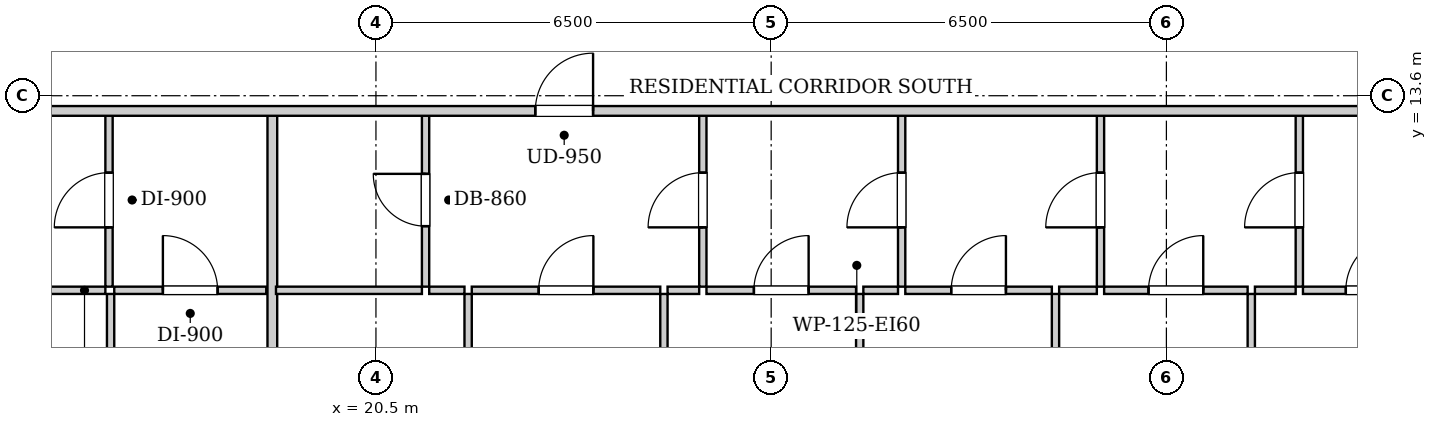
"""IFC4 building model, lengths in metres.
Left out: names, types, materials, properties, quantities, classifications, styles, units other than length and angle.
Written with IfcOpenShell. Run it as: python <this file> out.ifc"""

import sys

from ifc_helpers import new_model, si_unit, direction, frame, frame_2d, origin, place, context, subcontext, project, spatial, rectangle, extrude, element, fill, save


model = new_model("IFC4")
c1 = context("Model", 3, precision=1e-05, world=origin(), true_north=direction((0.0, 1.0)))
c2 = subcontext(c1, "Body", "Model", "MODEL_VIEW")
j1 = project(units=[si_unit("LENGTHUNIT", "METRE"), si_unit("PLANEANGLEUNIT", "RADIAN")], contexts=[c1])
p1 = place(None, origin())
s1 = spatial("IfcSite", under=j1, at=p1, CompositionType="ELEMENT")
p2 = place(p1, origin())
s2 = spatial("IfcBuilding", under=s1, at=p2, CompositionType="ELEMENT")
p3 = place(p2, frame((0.0, 0.0, 64.2)))
s3 = spatial("IfcBuildingStorey", under=s2, at=p3, CompositionType="ELEMENT", Elevation=64.2)
p4 = place(p3, frame((16.11, 10.46, 0.0), z_axis=(0.0, 0.0, 1.0), x_axis=(0.0, 1.0, 0.0)))
e1 = element("IfcWall", 1, at=p4, inside=s3, PredefinedType="PARTITIONING", context=c2, shape_type="SweptSolid", body=[
    extrude(rectangle(XDim=2.85, YDim=0.12, at=frame_2d((1.425, 0.0))), origin(), (0.0, 0.0, 1.0), 2.94),
])
p5 = place(p4, frame((0.975, 0.0, 0.0)))
e2 = element("IfcOpeningElement", 2, at=p5, cuts=e1, PredefinedType="OPENING", context=c2, shape_type="SweptSolid", body=[
    extrude(rectangle(XDim=0.9, YDim=2.05, at=frame_2d((0.45, 1.025))), frame((0.0, 0.07, 0.0), z_axis=(0.0, -1.0, 0.0), x_axis=(1.0, 0.0, 0.0)), (0.0, 0.0, 1.0), 0.14),
])
p6 = place(p3, frame((12.6, 10.4, 0.0), z_axis=(0.0, 0.0, 1.0), x_axis=(1.0, 0.0, 0.0)))
e3 = element("IfcWall", 3, at=p6, inside=s3, PredefinedType="PARTITIONING", context=c2, shape_type="SweptSolid", body=[
    extrude(rectangle(XDim=3.45, YDim=0.12, at=frame_2d((1.725, 0.0))), origin(), (0.0, 0.0, 1.0), 2.94),
])
p7 = place(p6, frame((1.275, 0.0, 0.0)))
e4 = element("IfcOpeningElement", 4, at=p7, cuts=e3, PredefinedType="OPENING", context=c2, shape_type="SweptSolid", body=[
    extrude(rectangle(XDim=0.9, YDim=2.05, at=frame_2d((0.45, 1.025))), frame((0.0, 0.07, 0.0), z_axis=(0.0, -1.0, 0.0), x_axis=(1.0, 0.0, 0.0)), (0.0, 0.0, 1.0), 0.14),
])
p8 = place(p3, frame((16.196, 10.4, 0.0), z_axis=(0.0, 0.0, 1.0), x_axis=(1.0, 0.0, 0.0)))
e5 = element("IfcWall", 5, at=p8, inside=s3, PredefinedType="PARTITIONING", context=c2, shape_type="SweptSolid", body=[
    extrude(rectangle(XDim=2.5, YDim=0.12, at=frame_2d((1.25, 0.0))), origin(), (0.0, 0.0, 1.0), 2.94),
])
p9 = place(p8, frame((0.8, 0.0, 0.0)))
e6 = element("IfcOpeningElement", 6, at=p9, cuts=e5, PredefinedType="OPENING", context=c2, shape_type="SweptSolid", body=[
    extrude(rectangle(XDim=0.9, YDim=2.05, at=frame_2d((0.45, 1.025))), frame((0.0, 0.07, 0.0), z_axis=(0.0, -1.0, 0.0), x_axis=(1.0, 0.0, 0.0)), (0.0, 0.0, 1.0), 0.14),
])
p10 = place(p3, frame((16.136, 2.43, 0.0), z_axis=(0.0, 0.0, 1.0), x_axis=(0.0, 1.0, 0.0)))
e7 = element("IfcWall", 7, at=p10, inside=s3, PredefinedType="PARTITIONING", context=c2, shape_type="SweptSolid", body=[
    extrude(rectangle(XDim=7.91, YDim=0.12, at=frame_2d((3.955, 0.0))), origin(), (0.0, 0.0, 1.0), 2.94),
])
p11 = place(p10, frame((3.505, 0.0, 0.0)))
e8 = element("IfcOpeningElement", 8, at=p11, cuts=e7, PredefinedType="OPENING", context=c2, shape_type="SweptSolid", body=[
    extrude(rectangle(XDim=0.9, YDim=2.05, at=frame_2d((0.45, 1.025))), frame((0.0, 0.07, 0.0), z_axis=(0.0, -1.0, 0.0), x_axis=(1.0, 0.0, 0.0)), (0.0, 0.0, 1.0), 0.14),
])
p12 = place(p3, frame((18.796, 0.28, 0.0), z_axis=(0.0, 0.0, 1.0), x_axis=(0.0, 1.0, 0.0)))
e9 = element("IfcWall", 9, at=p12, inside=s3, PredefinedType="PARTITIONING", context=c2, shape_type="SweptSolid", body=[
    extrude(rectangle(XDim=13.03, YDim=0.16, at=frame_2d((6.515, 0.0))), origin(), (0.0, 0.0, 1.0), 2.94),
])
p13 = place(p3, frame((21.316, 10.46, 0.0), z_axis=(0.0, 0.0, 1.0), x_axis=(0.0, 1.0, 0.0)))
e10 = element("IfcWall", 10, at=p13, inside=s3, PredefinedType="PARTITIONING", context=c2, shape_type="SweptSolid", body=[
    extrude(rectangle(XDim=2.85, YDim=0.12, at=frame_2d((1.425, 0.0))), origin(), (0.0, 0.0, 1.0), 2.94),
])
p14 = place(p13, frame((0.995, 0.0, 0.0)))
e11 = element("IfcOpeningElement", 11, at=p14, cuts=e10, PredefinedType="OPENING", context=c2, shape_type="SweptSolid", body=[
    extrude(rectangle(XDim=0.86, YDim=2.05, at=frame_2d((0.43, 1.025))), frame((0.0, 0.07, 0.0), z_axis=(0.0, -1.0, 0.0), x_axis=(1.0, 0.0, 0.0)), (0.0, 0.0, 1.0), 0.14),
])
p15 = place(p3, frame((18.856, 10.4, 0.0), z_axis=(0.0, 0.0, 1.0), x_axis=(1.0, 0.0, 0.0)))
e12 = element("IfcWall", 12, at=p15, inside=s3, PredefinedType="PARTITIONING", context=c2, shape_type="SweptSolid", body=[
    extrude(rectangle(XDim=2.4, YDim=0.12, at=frame_2d((1.2, 0.0))), origin(), (0.0, 0.0, 1.0), 2.94),
])
p16 = place(p3, frame((25.876, 10.46, 0.0), z_axis=(0.0, 0.0, 1.0), x_axis=(0.0, 1.0, 0.0)))
e13 = element("IfcWall", 13, at=p16, inside=s3, PredefinedType="PARTITIONING", context=c2, shape_type="SweptSolid", body=[
    extrude(rectangle(XDim=2.85, YDim=0.12, at=frame_2d((1.425, 0.0))), origin(), (0.0, 0.0, 1.0), 2.94),
])
p17 = place(p16, frame((0.975, 0.0, 0.0)))
e14 = element("IfcOpeningElement", 14, at=p17, cuts=e13, PredefinedType="OPENING", context=c2, shape_type="SweptSolid", body=[
    extrude(rectangle(XDim=0.9, YDim=2.05, at=frame_2d((0.45, 1.025))), frame((0.0, 0.07, 0.0), z_axis=(0.0, -1.0, 0.0), x_axis=(1.0, 0.0, 0.0)), (0.0, 0.0, 1.0), 0.14),
])
p18 = place(p3, frame((21.376, 10.4, 0.0), z_axis=(0.0, 0.0, 1.0), x_axis=(1.0, 0.0, 0.0)))
e15 = element("IfcWall", 15, at=p18, inside=s3, PredefinedType="PARTITIONING", context=c2, shape_type="SweptSolid", body=[
    extrude(rectangle(XDim=0.58, YDim=0.12, at=frame_2d((0.29, 0.0))), origin(), (0.0, 0.0, 1.0), 2.94),
])
p19 = place(p3, frame((22.076, 10.4, 0.0), z_axis=(0.0, 0.0, 1.0), x_axis=(1.0, 0.0, 0.0)))
e16 = element("IfcWall", 16, at=p19, inside=s3, PredefinedType="PARTITIONING", context=c2, shape_type="SweptSolid", body=[
    extrude(rectangle(XDim=3.1, YDim=0.12, at=frame_2d((1.55, 0.0))), origin(), (0.0, 0.0, 1.0), 2.94),
])
p20 = place(p19, frame((1.1, 0.0, 0.0)))
e17 = element("IfcOpeningElement", 17, at=p20, cuts=e16, PredefinedType="OPENING", context=c2, shape_type="SweptSolid", body=[
    extrude(rectangle(XDim=0.9, YDim=2.05, at=frame_2d((0.45, 1.025))), frame((0.0, 0.07, 0.0), z_axis=(0.0, -1.0, 0.0), x_axis=(1.0, 0.0, 0.0)), (0.0, 0.0, 1.0), 0.14),
])
p21 = place(p3, frame((25.296, 10.4, 0.0), z_axis=(0.0, 0.0, 1.0), x_axis=(1.0, 0.0, 0.0)))
e18 = element("IfcWall", 18, at=p21, inside=s3, PredefinedType="PARTITIONING", context=c2, shape_type="SweptSolid", body=[
    extrude(rectangle(XDim=0.52, YDim=0.12, at=frame_2d((0.26, 0.0))), origin(), (0.0, 0.0, 1.0), 2.94),
])
p22 = place(p3, frame((29.146, 10.46, 0.0), z_axis=(0.0, 0.0, 1.0), x_axis=(0.0, 1.0, 0.0)))
e19 = element("IfcWall", 19, at=p22, inside=s3, PredefinedType="PARTITIONING", context=c2, shape_type="SweptSolid", body=[
    extrude(rectangle(XDim=2.85, YDim=0.12, at=frame_2d((1.425, 0.0))), origin(), (0.0, 0.0, 1.0), 2.94),
])
p23 = place(p22, frame((0.975, 0.0, 0.0)))
e20 = element("IfcOpeningElement", 20, at=p23, cuts=e19, PredefinedType="OPENING", context=c2, shape_type="SweptSolid", body=[
    extrude(rectangle(XDim=0.9, YDim=2.05, at=frame_2d((0.45, 1.025))), frame((0.0, 0.07, 0.0), z_axis=(0.0, -1.0, 0.0), x_axis=(1.0, 0.0, 0.0)), (0.0, 0.0, 1.0), 0.14),
])
p24 = place(p3, frame((25.936, 10.4, 0.0), z_axis=(0.0, 0.0, 1.0), x_axis=(1.0, 0.0, 0.0)))
e21 = element("IfcWall", 21, at=p24, inside=s3, PredefinedType="PARTITIONING", context=c2, shape_type="SweptSolid", body=[
    extrude(rectangle(XDim=2.46, YDim=0.12, at=frame_2d((1.23, 0.0))), origin(), (0.0, 0.0, 1.0), 2.94),
])
p25 = place(p24, frame((0.78, 0.0, 0.0)))
e22 = element("IfcOpeningElement", 22, at=p25, cuts=e21, PredefinedType="OPENING", context=c2, shape_type="SweptSolid", body=[
    extrude(rectangle(XDim=0.9, YDim=2.05, at=frame_2d((0.45, 1.025))), frame((0.0, 0.07, 0.0), z_axis=(0.0, -1.0, 0.0), x_axis=(1.0, 0.0, 0.0)), (0.0, 0.0, 1.0), 0.14),
])
p26 = place(p3, frame((28.516, 10.4, 0.0), z_axis=(0.0, 0.0, 1.0), x_axis=(1.0, 0.0, 0.0)))
e23 = element("IfcWall", 23, at=p26, inside=s3, PredefinedType="PARTITIONING", context=c2, shape_type="SweptSolid", body=[
    extrude(rectangle(XDim=0.57, YDim=0.12, at=frame_2d((0.285, 0.0))), origin(), (0.0, 0.0, 1.0), 2.94),
])
p27 = place(p3, frame((32.416, 10.46, 0.0), z_axis=(0.0, 0.0, 1.0), x_axis=(0.0, 1.0, 0.0)))
e24 = element("IfcWall", 24, at=p27, inside=s3, PredefinedType="PARTITIONING", context=c2, shape_type="SweptSolid", body=[
    extrude(rectangle(XDim=2.85, YDim=0.12, at=frame_2d((1.425, 0.0))), origin(), (0.0, 0.0, 1.0), 2.94),
])
p28 = place(p27, frame((0.975, 0.0, 0.0)))
e25 = element("IfcOpeningElement", 25, at=p28, cuts=e24, PredefinedType="OPENING", context=c2, shape_type="SweptSolid", body=[
    extrude(rectangle(XDim=0.9, YDim=2.05, at=frame_2d((0.45, 1.025))), frame((0.0, 0.07, 0.0), z_axis=(0.0, -1.0, 0.0), x_axis=(1.0, 0.0, 0.0)), (0.0, 0.0, 1.0), 0.14),
])
p29 = place(p3, frame((29.206, 10.4, 0.0), z_axis=(0.0, 0.0, 1.0), x_axis=(1.0, 0.0, 0.0)))
e26 = element("IfcWall", 26, at=p29, inside=s3, PredefinedType="PARTITIONING", context=c2, shape_type="SweptSolid", body=[
    extrude(rectangle(XDim=2.41, YDim=0.12, at=frame_2d((1.205, 0.0))), origin(), (0.0, 0.0, 1.0), 2.94),
])
p30 = place(p29, frame((0.755, 0.0, 0.0)))
e27 = element("IfcOpeningElement", 27, at=p30, cuts=e26, PredefinedType="OPENING", context=c2, shape_type="SweptSolid", body=[
    extrude(rectangle(XDim=0.9, YDim=2.05, at=frame_2d((0.45, 1.025))), frame((0.0, 0.07, 0.0), z_axis=(0.0, -1.0, 0.0), x_axis=(1.0, 0.0, 0.0)), (0.0, 0.0, 1.0), 0.14),
])
p31 = place(p3, frame((31.736, 10.4, 0.0), z_axis=(0.0, 0.0, 1.0), x_axis=(1.0, 0.0, 0.0)))
e28 = element("IfcWall", 28, at=p31, inside=s3, PredefinedType="PARTITIONING", context=c2, shape_type="SweptSolid", body=[
    extrude(rectangle(XDim=0.62, YDim=0.12, at=frame_2d((0.31, 0.0))), origin(), (0.0, 0.0, 1.0), 2.94),
])
p32 = place(p3, frame((35.686, 10.46, 0.0), z_axis=(0.0, 0.0, 1.0), x_axis=(0.0, 1.0, 0.0)))
e29 = element("IfcWall", 29, at=p32, inside=s3, PredefinedType="PARTITIONING", context=c2, shape_type="SweptSolid", body=[
    extrude(rectangle(XDim=2.85, YDim=0.12, at=frame_2d((1.425, 0.0))), origin(), (0.0, 0.0, 1.0), 2.94),
])
p33 = place(p32, frame((0.975, 0.0, 0.0)))
e30 = element("IfcOpeningElement", 30, at=p33, cuts=e29, PredefinedType="OPENING", context=c2, shape_type="SweptSolid", body=[
    extrude(rectangle(XDim=0.9, YDim=2.05, at=frame_2d((0.45, 1.025))), frame((0.0, 0.07, 0.0), z_axis=(0.0, -1.0, 0.0), x_axis=(1.0, 0.0, 0.0)), (0.0, 0.0, 1.0), 0.14),
])
p34 = place(p3, frame((32.476, 10.4, 0.0), z_axis=(0.0, 0.0, 1.0), x_axis=(1.0, 0.0, 0.0)))
e31 = element("IfcWall", 31, at=p34, inside=s3, PredefinedType="PARTITIONING", context=c2, shape_type="SweptSolid", body=[
    extrude(rectangle(XDim=2.36, YDim=0.12, at=frame_2d((1.18, 0.0))), origin(), (0.0, 0.0, 1.0), 2.94),
])
p35 = place(p34, frame((0.73, 0.0, 0.0)))
e32 = element("IfcOpeningElement", 32, at=p35, cuts=e31, PredefinedType="OPENING", context=c2, shape_type="SweptSolid", body=[
    extrude(rectangle(XDim=0.9, YDim=2.05, at=frame_2d((0.45, 1.025))), frame((0.0, 0.07, 0.0), z_axis=(0.0, -1.0, 0.0), x_axis=(1.0, 0.0, 0.0)), (0.0, 0.0, 1.0), 0.14),
])
p36 = place(p3, frame((34.956, 10.4, 0.0), z_axis=(0.0, 0.0, 1.0), x_axis=(1.0, 0.0, 0.0)))
e33 = element("IfcWall", 33, at=p36, inside=s3, PredefinedType="PARTITIONING", context=c2, shape_type="SweptSolid", body=[
    extrude(rectangle(XDim=0.67, YDim=0.12, at=frame_2d((0.335, 0.0))), origin(), (0.0, 0.0, 1.0), 2.94),
])
p37 = place(p3, frame((35.746, 10.4, 0.0), z_axis=(0.0, 0.0, 1.0), x_axis=(1.0, 0.0, 0.0)))
e34 = element("IfcWall", 34, at=p37, inside=s3, PredefinedType="PARTITIONING", context=c2, shape_type="SweptSolid", body=[
    extrude(rectangle(XDim=2.31, YDim=0.12, at=frame_2d((1.155, 0.0))), origin(), (0.0, 0.0, 1.0), 2.94),
])
p38 = place(p37, frame((0.705, 0.0, 0.0)))
e35 = element("IfcOpeningElement", 35, at=p38, cuts=e34, PredefinedType="OPENING", context=c2, shape_type="SweptSolid", body=[
    extrude(rectangle(XDim=0.9, YDim=2.05, at=frame_2d((0.45, 1.025))), frame((0.0, 0.07, 0.0), z_axis=(0.0, -1.0, 0.0), x_axis=(1.0, 0.0, 0.0)), (0.0, 0.0, 1.0), 0.14),
])
p39 = place(p3, frame((22.016, 0.28, 0.0), z_axis=(0.0, 0.0, 1.0), x_axis=(0.0, 1.0, 0.0)))
e36 = element("IfcWall", 36, at=p39, inside=s3, PredefinedType="PARTITIONING", context=c2, shape_type="SweptSolid", body=[
    extrude(rectangle(XDim=10.06, YDim=0.12, at=frame_2d((5.03, 0.0))), origin(), (0.0, 0.0, 1.0), 2.94),
])
p40 = place(p39, frame((4.565, 0.0, 0.0)))
e37 = element("IfcOpeningElement", 37, at=p40, cuts=e36, PredefinedType="OPENING", context=c2, shape_type="SweptSolid", body=[
    extrude(rectangle(XDim=0.9, YDim=2.05, at=frame_2d((0.45, 1.025))), frame((0.0, 0.07, 0.0), z_axis=(0.0, -1.0, 0.0), x_axis=(1.0, 0.0, 0.0)), (0.0, 0.0, 1.0), 0.14),
])
p41 = place(p3, frame((25.236, 0.28, 0.0), z_axis=(0.0, 0.0, 1.0), x_axis=(0.0, 1.0, 0.0)))
e38 = element("IfcWall", 38, at=p41, inside=s3, PredefinedType="PARTITIONING", context=c2, shape_type="SweptSolid", body=[
    extrude(rectangle(XDim=10.06, YDim=0.12, at=frame_2d((5.03, 0.0))), origin(), (0.0, 0.0, 1.0), 2.94),
])
p42 = place(p41, frame((4.565, 0.0, 0.0)))
e39 = element("IfcOpeningElement", 39, at=p42, cuts=e38, PredefinedType="OPENING", context=c2, shape_type="SweptSolid", body=[
    extrude(rectangle(XDim=0.9, YDim=2.05, at=frame_2d((0.45, 1.025))), frame((0.0, 0.07, 0.0), z_axis=(0.0, -1.0, 0.0), x_axis=(1.0, 0.0, 0.0)), (0.0, 0.0, 1.0), 0.14),
])
p43 = place(p3, frame((28.456, 0.28, 0.0), z_axis=(0.0, 0.0, 1.0), x_axis=(0.0, 1.0, 0.0)))
e40 = element("IfcWall", 40, at=p43, inside=s3, PredefinedType="PARTITIONING", context=c2, shape_type="SweptSolid", body=[
    extrude(rectangle(XDim=10.06, YDim=0.12, at=frame_2d((5.03, 0.0))), origin(), (0.0, 0.0, 1.0), 2.94),
])
p44 = place(p43, frame((4.565, 0.0, 0.0)))
e41 = element("IfcOpeningElement", 41, at=p44, cuts=e40, PredefinedType="OPENING", context=c2, shape_type="SweptSolid", body=[
    extrude(rectangle(XDim=0.9, YDim=2.05, at=frame_2d((0.45, 1.025))), frame((0.0, 0.07, 0.0), z_axis=(0.0, -1.0, 0.0), x_axis=(1.0, 0.0, 0.0)), (0.0, 0.0, 1.0), 0.14),
])
p45 = place(p3, frame((31.676, 0.28, 0.0), z_axis=(0.0, 0.0, 1.0), x_axis=(0.0, 1.0, 0.0)))
e42 = element("IfcWall", 42, at=p45, inside=s3, PredefinedType="PARTITIONING", context=c2, shape_type="SweptSolid", body=[
    extrude(rectangle(XDim=10.06, YDim=0.12, at=frame_2d((5.03, 0.0))), origin(), (0.0, 0.0, 1.0), 2.94),
])
p46 = place(p45, frame((4.565, 0.0, 0.0)))
e43 = element("IfcOpeningElement", 43, at=p46, cuts=e42, PredefinedType="OPENING", context=c2, shape_type="SweptSolid", body=[
    extrude(rectangle(XDim=0.9, YDim=2.05, at=frame_2d((0.45, 1.025))), frame((0.0, 0.07, 0.0), z_axis=(0.0, -1.0, 0.0), x_axis=(1.0, 0.0, 0.0)), (0.0, 0.0, 1.0), 0.14),
])
p47 = place(p3, frame((34.896, 0.28, 0.0), z_axis=(0.0, 0.0, 1.0), x_axis=(0.0, 1.0, 0.0)))
e44 = element("IfcWall", 44, at=p47, inside=s3, PredefinedType="PARTITIONING", context=c2, shape_type="SweptSolid", body=[
    extrude(rectangle(XDim=10.06, YDim=0.12, at=frame_2d((5.03, 0.0))), origin(), (0.0, 0.0, 1.0), 2.94),
])
p48 = place(p47, frame((4.565, 0.0, 0.0)))
e45 = element("IfcOpeningElement", 45, at=p48, cuts=e44, PredefinedType="OPENING", context=c2, shape_type="SweptSolid", body=[
    extrude(rectangle(XDim=0.9, YDim=2.05, at=frame_2d((0.45, 1.025))), frame((0.0, 0.07, 0.0), z_axis=(0.0, -1.0, 0.0), x_axis=(1.0, 0.0, 0.0)), (0.0, 0.0, 1.0), 0.14),
])
p49 = place(p3, frame((10.05, 13.35, 0.0), z_axis=(0.0, 0.0, 1.0), x_axis=(1.0, 0.0, 0.0)))
e46 = element("IfcWall", 46, at=p49, inside=s3, PredefinedType="PARTITIONING", context=c2, shape_type="SweptSolid", body=[
    extrude(rectangle(XDim=33.9, YDim=0.16, at=frame_2d((16.95, 0.0))), origin(), (0.0, 0.0, 1.0), 2.94),
])
p50 = place(p49, frame((3.8, 0.0, 0.0)))
e47 = element("IfcOpeningElement", 47, at=p50, cuts=e46, PredefinedType="OPENING", context=c2, shape_type="SweptSolid", body=[
    extrude(rectangle(XDim=0.95, YDim=2.1, at=frame_2d((0.475, 1.05))), frame((0.0, 0.09, 0.0), z_axis=(0.0, -1.0, 0.0), x_axis=(1.0, 0.0, 0.0)), (0.0, 0.0, 1.0), 0.18),
])
p51 = place(p49, frame((13.071, 0.0, 0.0)))
e48 = element("IfcOpeningElement", 48, at=p51, cuts=e46, PredefinedType="OPENING", context=c2, shape_type="SweptSolid", body=[
    extrude(rectangle(XDim=0.95, YDim=2.1, at=frame_2d((0.475, 1.05))), frame((0.0, 0.09, 0.0), z_axis=(0.0, -1.0, 0.0), x_axis=(1.0, 0.0, 0.0)), (0.0, 0.0, 1.0), 0.18),
])
p52 = place(p5, origin())
e49 = element("IfcDoor", 49, at=p52, inside=s3, OperationType="SINGLE_SWING_LEFT", PredefinedType="DOOR", context=c2, shape_type="SweptSolid", body=[
    extrude(rectangle(XDim=0.9, YDim=2.05, at=frame_2d((0.45, 1.025))), frame((0.0, 0.025, 0.0), z_axis=(0.0, -1.0, 0.0), x_axis=(1.0, 0.0, 0.0)), (0.0, 0.0, 1.0), 0.05),
])
fill(e2, e49)
p53 = place(p9, origin())
e50 = element("IfcDoor", 50, at=p53, inside=s3, OperationType="SINGLE_SWING_LEFT", PredefinedType="DOOR", context=c2, shape_type="SweptSolid", body=[
    extrude(rectangle(XDim=0.9, YDim=2.05, at=frame_2d((0.45, 1.025))), frame((0.0, 0.025, 0.0), z_axis=(0.0, -1.0, 0.0), x_axis=(1.0, 0.0, 0.0)), (0.0, 0.0, 1.0), 0.05),
])
fill(e6, e50)
p54 = place(p14, origin())
e51 = element("IfcDoor", 51, at=p54, inside=s3, OperationType="SINGLE_SWING_RIGHT", PredefinedType="DOOR", context=c2, shape_type="SweptSolid", body=[
    extrude(rectangle(XDim=0.86, YDim=2.05, at=frame_2d((0.43, 1.025))), frame((0.0, 0.025, 0.0), z_axis=(0.0, -1.0, 0.0), x_axis=(1.0, 0.0, 0.0)), (0.0, 0.0, 1.0), 0.05),
])
fill(e11, e51)
p55 = place(p17, origin())
e52 = element("IfcDoor", 52, at=p55, inside=s3, OperationType="SINGLE_SWING_LEFT", PredefinedType="DOOR", context=c2, shape_type="SweptSolid", body=[
    extrude(rectangle(XDim=0.9, YDim=2.05, at=frame_2d((0.45, 1.025))), frame((0.0, 0.025, 0.0), z_axis=(0.0, -1.0, 0.0), x_axis=(1.0, 0.0, 0.0)), (0.0, 0.0, 1.0), 0.05),
])
fill(e14, e52)
p56 = place(p20, origin())
e53 = element("IfcDoor", 53, at=p56, inside=s3, OperationType="SINGLE_SWING_RIGHT", PredefinedType="DOOR", context=c2, shape_type="SweptSolid", body=[
    extrude(rectangle(XDim=0.9, YDim=2.05, at=frame_2d((0.45, 1.025))), frame((0.0, 0.025, 0.0), z_axis=(0.0, -1.0, 0.0), x_axis=(1.0, 0.0, 0.0)), (0.0, 0.0, 1.0), 0.05),
])
fill(e17, e53)
p57 = place(p23, origin())
e54 = element("IfcDoor", 54, at=p57, inside=s3, OperationType="SINGLE_SWING_LEFT", PredefinedType="DOOR", context=c2, shape_type="SweptSolid", body=[
    extrude(rectangle(XDim=0.9, YDim=2.05, at=frame_2d((0.45, 1.025))), frame((0.0, 0.025, 0.0), z_axis=(0.0, -1.0, 0.0), x_axis=(1.0, 0.0, 0.0)), (0.0, 0.0, 1.0), 0.05),
])
fill(e20, e54)
p58 = place(p25, origin())
e55 = element("IfcDoor", 55, at=p58, inside=s3, OperationType="SINGLE_SWING_RIGHT", PredefinedType="DOOR", context=c2, shape_type="SweptSolid", body=[
    extrude(rectangle(XDim=0.9, YDim=2.05, at=frame_2d((0.45, 1.025))), frame((0.0, 0.025, 0.0), z_axis=(0.0, -1.0, 0.0), x_axis=(1.0, 0.0, 0.0)), (0.0, 0.0, 1.0), 0.05),
])
fill(e22, e55)
p59 = place(p28, origin())
e56 = element("IfcDoor", 56, at=p59, inside=s3, OperationType="SINGLE_SWING_LEFT", PredefinedType="DOOR", context=c2, shape_type="SweptSolid", body=[
    extrude(rectangle(XDim=0.9, YDim=2.05, at=frame_2d((0.45, 1.025))), frame((0.0, 0.025, 0.0), z_axis=(0.0, -1.0, 0.0), x_axis=(1.0, 0.0, 0.0)), (0.0, 0.0, 1.0), 0.05),
])
fill(e25, e56)
p60 = place(p30, origin())
e57 = element("IfcDoor", 57, at=p60, inside=s3, OperationType="SINGLE_SWING_RIGHT", PredefinedType="DOOR", context=c2, shape_type="SweptSolid", body=[
    extrude(rectangle(XDim=0.9, YDim=2.05, at=frame_2d((0.45, 1.025))), frame((0.0, 0.025, 0.0), z_axis=(0.0, -1.0, 0.0), x_axis=(1.0, 0.0, 0.0)), (0.0, 0.0, 1.0), 0.05),
])
fill(e27, e57)
p61 = place(p33, origin())
e58 = element("IfcDoor", 58, at=p61, inside=s3, OperationType="SINGLE_SWING_LEFT", PredefinedType="DOOR", context=c2, shape_type="SweptSolid", body=[
    extrude(rectangle(XDim=0.9, YDim=2.05, at=frame_2d((0.45, 1.025))), frame((0.0, 0.025, 0.0), z_axis=(0.0, -1.0, 0.0), x_axis=(1.0, 0.0, 0.0)), (0.0, 0.0, 1.0), 0.05),
])
fill(e30, e58)
p62 = place(p35, origin())
e59 = element("IfcDoor", 59, at=p62, inside=s3, OperationType="SINGLE_SWING_RIGHT", PredefinedType="DOOR", context=c2, shape_type="SweptSolid", body=[
    extrude(rectangle(XDim=0.9, YDim=2.05, at=frame_2d((0.45, 1.025))), frame((0.0, 0.025, 0.0), z_axis=(0.0, -1.0, 0.0), x_axis=(1.0, 0.0, 0.0)), (0.0, 0.0, 1.0), 0.05),
])
fill(e32, e59)
p63 = place(p38, origin())
e60 = element("IfcDoor", 60, at=p63, inside=s3, OperationType="SINGLE_SWING_RIGHT", PredefinedType="DOOR", context=c2, shape_type="SweptSolid", body=[
    extrude(rectangle(XDim=0.9, YDim=2.05, at=frame_2d((0.45, 1.025))), frame((0.0, 0.025, 0.0), z_axis=(0.0, -1.0, 0.0), x_axis=(1.0, 0.0, 0.0)), (0.0, 0.0, 1.0), 0.05),
])
fill(e35, e60)
p64 = place(p51, origin())
e61 = element("IfcDoor", 61, at=p64, inside=s3, OperationType="SINGLE_SWING_RIGHT", PredefinedType="DOOR", context=c2, shape_type="SweptSolid", body=[
    extrude(rectangle(XDim=0.95, YDim=2.1, at=frame_2d((0.475, 1.05))), frame((0.0, 0.025, 0.0), z_axis=(0.0, -1.0, 0.0), x_axis=(1.0, 0.0, 0.0)), (0.0, 0.0, 1.0), 0.05),
])
fill(e48, e61)
save(model, sys.argv[1])
